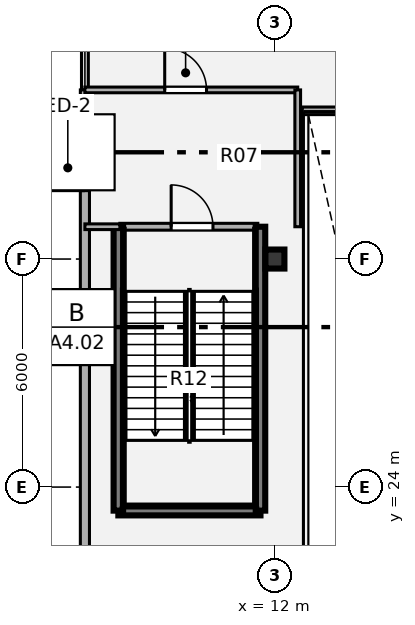
"""IFC4 building model, lengths in metres.
Left out: names, types, materials, properties, quantities, classifications, styles, units other than length and angle.
Written with IfcOpenShell. Run it as: python <this file> out.ifc"""

import sys

from ifc_helpers import new_model, si_unit, direction, frame, frame_2d, origin, origin_2d, place, context, subcontext, project, spatial, rectangle, i_section, extrude, source, transform, mapped, element, fill, save


model = new_model("IFC4")
c1 = context("Model", 3, precision=1e-05, world=origin(), true_north=direction((0.0, 1.0)))
c2 = subcontext(c1, "Body", "Model", "MODEL_VIEW")
j1 = project(units=[si_unit("LENGTHUNIT", "METRE"), si_unit("PLANEANGLEUNIT", "RADIAN")], contexts=[c1])
p1 = place(None, origin())
s1 = spatial("IfcSite", under=j1, at=p1, CompositionType="ELEMENT")
p2 = place(p1, origin())
s2 = spatial("IfcBuilding", under=s1, at=p2, CompositionType="ELEMENT")
p3 = place(p2, origin())
s3 = spatial("IfcBuildingStorey", under=s2, at=p3, CompositionType="ELEMENT", Elevation=0.0)
m1 = source(origin(), c2, "Body", "SweptSolid", [
    extrude(i_section(OverallWidth=0.5, OverallDepth=0.5, WebThickness=0.028, FlangeThickness=0.045, at=origin_2d()), origin(), (0.0, 0.0, 1.0), 5.4),
])
p4 = place(p3, frame((12.0, 30.0, 0.0), z_axis=(0.0, 0.0, 1.0), x_axis=(1.0, 0.0, 0.0)))
e1 = element("IfcColumn", 1, at=p4, inside=s3, PredefinedType="COLUMN", context=c2, shape_type="MappedRepresentation", body=[
    mapped(m1, transform((0.0, 0.0, 0.0), x_axis=(1.0, 0.0, 0.0), y_axis=(0.0, 1.0, 0.0), z_axis=(0.0, 0.0, 1.0), scale=1.0)),
])
p5 = place(p3, frame((7.0, 5.6, 0.0), z_axis=(0.0, 0.0, 1.0), x_axis=(0.0, 1.0, 0.0)))
e2 = element("IfcWall", 2, at=p5, inside=s3, PredefinedType="SOLIDWALL", context=c2, shape_type="SweptSolid", body=[
    extrude(rectangle(XDim=28.85, YDim=0.24, at=frame_2d((14.425, 0.0))), origin(), (0.0, 0.0, 1.0), 5.12),
])
p6 = place(p5, frame((26.2, 0.0, 0.0)))
e3 = element("IfcOpeningElement", 3, at=p6, cuts=e2, PredefinedType="OPENING", context=c2, shape_type="SweptSolid", body=[
    extrude(rectangle(XDim=1.2, YDim=2.2, at=origin_2d()), frame((0.6, 0.13, 1.1), z_axis=(0.0, -1.0, 0.0), x_axis=(1.0, 0.0, 0.0)), (0.0, 0.0, 1.0), 0.26),
])
p7 = place(p5, frame((4.0, 0.0, 1.1)))
e4 = element("IfcOpeningElement", 4, at=p7, cuts=e2, PredefinedType="OPENING", context=c2, shape_type="SweptSolid", body=[
    extrude(rectangle(XDim=1.8, YDim=1.5, at=origin_2d()), frame((0.9, 0.13, 0.75), z_axis=(0.0, -1.0, 0.0), x_axis=(1.0, 0.0, 0.0)), (0.0, 0.0, 1.0), 0.26),
])
p8 = place(p3, frame((12.72, 33.9, 0.0), z_axis=(0.0, 0.0, 1.0), x_axis=(1.0, 0.0, 0.0)))
e5 = element("IfcWall", 5, at=p8, inside=s3, PredefinedType="PARAPET", context=c2, shape_type="SweptSolid", body=[
    extrude(rectangle(XDim=5.12, YDim=0.2, at=frame_2d((2.56, 0.0))), origin(), (0.0, 0.0, 1.0), 1.22),
])
p9 = place(p3, frame((7.92, 30.85, 0.0), z_axis=(0.0, 0.0, 1.0), x_axis=(1.0, 0.0, 0.0)))
e6 = element("IfcWall", 6, at=p9, inside=s3, PredefinedType="PARTITIONING", context=c2, shape_type="SweptSolid", body=[
    extrude(rectangle(XDim=3.63, YDim=0.18, at=frame_2d((1.815, 0.0))), origin(), (0.0, 0.0, 1.0), 5.12),
])
p10 = place(p9, frame((1.35, 0.0, 0.0)))
e7 = element("IfcOpeningElement", 7, at=p10, cuts=e6, PredefinedType="OPENING", context=c2, shape_type="SweptSolid", body=[
    extrude(rectangle(XDim=1.1, YDim=2.1, at=origin_2d()), frame((0.55, 0.1, 1.05), z_axis=(0.0, -1.0, 0.0), x_axis=(1.0, 0.0, 0.0)), (0.0, 0.0, 1.0), 0.2),
])
p11 = place(p3, frame((7.88, 23.38, 0.0), z_axis=(0.0, 0.0, 1.0), x_axis=(1.0, 0.0, 0.0)))
e8 = element("IfcWall", 8, at=p11, inside=s3, PredefinedType="SHEAR", context=c2, shape_type="SweptSolid", body=[
    extrude(rectangle(XDim=3.74, YDim=0.25, at=frame_2d((1.87, 0.0))), origin(), (0.0, 0.0, 1.0), 5.4),
])
for number, where, z_axis, x_axis in (
    (9, (7.88, 23.38, 0.0), (0.0, 0.0, 1.0), (0.0, 1.0, 0.0)),
    (10, (11.62, 23.38, 0.0), (0.0, 0.0, 1.0), (0.0, 1.0, 0.0)),
):
    element("IfcWall", number, at=place(p3, frame(where, z_axis=z_axis, x_axis=x_axis)), inside=s3, PredefinedType="SHEAR", context=c2, shape_type="SweptSolid", body=[
        extrude(rectangle(XDim=7.47, YDim=0.25, at=frame_2d((3.735, 0.0))), origin(), (0.0, 0.0, 1.0), 5.4),
    ])
p12 = place(p3, frame((7.0, 30.85, 0.0), z_axis=(0.0, 0.0, 1.0), x_axis=(1.0, 0.0, 0.0)))
e11 = element("IfcWall", 11, at=p12, inside=s3, PredefinedType="PARTITIONING", context=c2, shape_type="SweptSolid", body=[
    extrude(rectangle(XDim=0.92, YDim=0.15, at=frame_2d((0.46, 0.0))), origin(), (0.0, 0.0, 1.0), 5.09),
])
p13 = place(p3, frame((7.0, 34.45, 0.0), z_axis=(0.0, 0.0, 1.0), x_axis=(1.0, 0.0, 0.0)))
e12 = element("IfcWall", 12, at=p13, inside=s3, PredefinedType="PARTITIONING", context=c2, shape_type="SweptSolid", body=[
    extrude(rectangle(XDim=5.6, YDim=0.15, at=frame_2d((2.8, 0.0))), origin(), (0.0, 0.0, 1.0), 5.09),
])
p14 = place(p13, frame((2.1, 0.0, 0.0)))
e13 = element("IfcOpeningElement", 13, at=p14, cuts=e12, PredefinedType="OPENING", context=c2, shape_type="SweptSolid", body=[
    extrude(rectangle(XDim=1.1, YDim=2.1, at=origin_2d()), frame((0.55, 0.085, 1.05), z_axis=(0.0, -1.0, 0.0), x_axis=(1.0, 0.0, 0.0)), (0.0, 0.0, 1.0), 0.17),
])
p15 = place(p3, frame((12.6, 30.85, 0.0), z_axis=(0.0, 0.0, 1.0), x_axis=(0.0, 1.0, 0.0)))
e14 = element("IfcWall", 14, at=p15, inside=s3, PredefinedType="PARTITIONING", context=c2, shape_type="SweptSolid", body=[
    extrude(rectangle(XDim=3.6, YDim=0.15, at=frame_2d((1.8, 0.0))), origin(), (0.0, 0.0, 1.0), 5.09),
])
m2 = source(origin(), c2, "Body", "SweptSolid", [
    extrude(rectangle(XDim=1.2, YDim=2.2, at=origin_2d()), frame((0.6, 0.025, 1.1), z_axis=(0.0, -1.0, 0.0), x_axis=(1.0, 0.0, 0.0)), (0.0, 0.0, 1.0), 0.05),
])
p16 = place(p6, origin())
e15 = element("IfcDoor", 15, at=p16, inside=s3, OperationType="SINGLE_SWING_LEFT", PredefinedType="DOOR", context=c2, shape_type="MappedRepresentation", body=[
    mapped(m2, transform((0.0, 0.0, 0.0), x_axis=(1.0, 0.0, 0.0), y_axis=(0.0, 1.0, 0.0), z_axis=(0.0, 0.0, 1.0), scale=1.0)),
])
fill(e3, e15)
m3 = source(origin(), c2, "Body", "SweptSolid", [
    extrude(rectangle(XDim=1.1, YDim=2.1, at=origin_2d()), frame((0.55, 0.025, 1.05), z_axis=(0.0, -1.0, 0.0), x_axis=(1.0, 0.0, 0.0)), (0.0, 0.0, 1.0), 0.05),
])
p17 = place(p10, origin())
e16 = element("IfcDoor", 16, at=p17, inside=s3, OperationType="SINGLE_SWING_LEFT", PredefinedType="DOOR", context=c2, shape_type="MappedRepresentation", body=[
    mapped(m3, transform((0.0, 0.0, 0.0), x_axis=(1.0, 0.0, 0.0), y_axis=(0.0, 1.0, 0.0), z_axis=(0.0, 0.0, 1.0), scale=1.0)),
])
fill(e7, e16)
p18 = place(p14, origin())
e17 = element("IfcDoor", 17, at=p18, inside=s3, OperationType="SINGLE_SWING_LEFT", PredefinedType="DOOR", context=c2, shape_type="MappedRepresentation", body=[
    mapped(m3, transform((0.0, 0.0, 0.0), x_axis=(1.0, 0.0, 0.0), y_axis=(0.0, 1.0, 0.0), z_axis=(0.0, 0.0, 1.0), scale=1.0)),
])
fill(e13, e17)
save(model, sys.argv[1])
